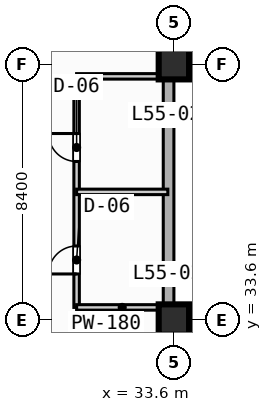
"""IFC4 building model, lengths in metres.
Left out: names, types, materials, properties, quantities, classifications, styles, units other than length and angle.
Written with IfcOpenShell. Run it as: python <this file> out.ifc"""

import sys

from ifc_helpers import new_model, si_unit, direction, frame, frame_2d, origin, origin_2d, place, context, subcontext, project, spatial, rectangle, extrude, element, fill, save


model = new_model("IFC4")
c1 = context("Model", 3, precision=1e-05, world=origin(), true_north=direction((0.0, 1.0)))
c2 = subcontext(c1, "Body", "Model", "MODEL_VIEW")
j1 = project(units=[si_unit("LENGTHUNIT", "METRE"), si_unit("PLANEANGLEUNIT", "RADIAN")], contexts=[c1])
p1 = place(None, origin())
s1 = spatial("IfcSite", under=j1, at=p1, CompositionType="ELEMENT")
p2 = place(p1, origin())
s2 = spatial("IfcBuilding", under=s1, at=p2, CompositionType="ELEMENT")
p3 = place(p2, frame((0.0, 0.0, 224.0)))
s3 = spatial("IfcBuildingStorey", under=s2, at=p3, CompositionType="ELEMENT", Elevation=224.0)
for number, where, z_axis, x_axis in (
    (1, (33.6, 33.6, 0.0), (0.0, 0.0, 1.0), (1.0, 0.0, 0.0)),
    (2, (33.6, 42.0, 0.0), (0.0, 0.0, 1.0), (1.0, 0.0, 0.0)),
):
    element("IfcColumn", number, at=place(p3, frame(where, z_axis=z_axis, x_axis=x_axis)), inside=s3, PredefinedType="COLUMN", context=c2, shape_type="SweptSolid", body=[
        extrude(rectangle(XDim=1.0, YDim=1.0, at=origin_2d()), origin(), (0.0, 0.0, 1.0), 4.2),
    ])
p4 = place(p3, frame((33.425, 72.425, 0.0), z_axis=(0.0, 0.0, 1.0), x_axis=(0.0, -1.0, 0.0)))
e3 = element("IfcWall", 3, at=p4, inside=s3, PredefinedType="STANDARD", context=c2, shape_type="SweptSolid", body=[
    extrude(rectangle(XDim=39.0, YDim=0.35, at=frame_2d((19.5, 0.0))), origin(), (0.0, 0.0, 1.0), 3.75),
])
p5 = place(p3, frame((33.425, 33.425, 0.0), z_axis=(0.0, 0.0, 1.0), x_axis=(1.0, 0.0, 0.0)))
e4 = element("IfcWall", 4, at=p5, inside=s3, PredefinedType="STANDARD", context=c2, shape_type="SweptSolid", body=[
    extrude(rectangle(XDim=39.0, YDim=0.35, at=frame_2d((19.5, 0.0))), origin(), (0.0, 0.0, 1.0), 3.75),
])
p6 = place(p5, frame((12.075, 0.0, 0.0)))
e5 = element("IfcOpeningElement", 5, at=p6, cuts=e4, PredefinedType="OPENING", context=c2, shape_type="SweptSolid", body=[
    extrude(rectangle(XDim=1.4, YDim=2.2, at=frame_2d((0.7, 1.1))), frame((0.0, 0.185, 0.0), z_axis=(0.0, -1.0, 0.0), x_axis=(1.0, 0.0, 0.0)), (0.0, 0.0, 1.0), 0.37),
])
p7 = place(p3, frame((30.4, 34.0, 0.0), z_axis=(0.0, 0.0, 1.0), x_axis=(0.0, 1.0, 0.0)))
e6 = element("IfcWall", 6, at=p7, inside=s3, PredefinedType="PLUMBINGWALL", context=c2, shape_type="SweptSolid", body=[
    extrude(rectangle(XDim=7.6, YDim=0.18, at=frame_2d((3.8, 0.0))), origin(), (0.0, 0.0, 1.0), 3.75),
])
p8 = place(p7, frame((1.1, 0.0, 0.0)))
e7 = element("IfcOpeningElement", 7, at=p8, cuts=e6, PredefinedType="OPENING", context=c2, shape_type="SweptSolid", body=[
    extrude(rectangle(XDim=0.92, YDim=2.1, at=frame_2d((0.46, 1.05))), frame((0.0, 0.1, 0.0), z_axis=(0.0, -1.0, 0.0), x_axis=(1.0, 0.0, 0.0)), (0.0, 0.0, 1.0), 0.2),
])
p9 = place(p7, frame((4.8, 0.0, 0.0)))
e8 = element("IfcOpeningElement", 8, at=p9, cuts=e6, PredefinedType="OPENING", context=c2, shape_type="SweptSolid", body=[
    extrude(rectangle(XDim=0.92, YDim=2.1, at=frame_2d((0.46, 1.05))), frame((0.0, 0.1, 0.0), z_axis=(0.0, -1.0, 0.0), x_axis=(1.0, 0.0, 0.0)), (0.0, 0.0, 1.0), 0.2),
])
for number, where, z_axis, x_axis in (
    (9, (30.4, 34.0, 0.0), (0.0, 0.0, 1.0), (1.0, 0.0, 0.0)),
    (10, (30.4, 37.8, 0.0), (0.0, 0.0, 1.0), (1.0, 0.0, 0.0)),
    (11, (30.4, 41.6, 0.0), (0.0, 0.0, 1.0), (1.0, 0.0, 0.0)),
):
    element("IfcWall", number, at=place(p3, frame(where, z_axis=z_axis, x_axis=x_axis)), inside=s3, PredefinedType="PLUMBINGWALL", context=c2, shape_type="SweptSolid", body=[
        extrude(rectangle(XDim=3.0, YDim=0.18, at=frame_2d((1.5, 0.0))), origin(), (0.0, 0.0, 1.0), 3.75),
    ])
p10 = place(p8, origin())
e12 = element("IfcDoor", 12, at=p10, inside=s3, OperationType="SINGLE_SWING_LEFT", PredefinedType="DOOR", context=c2, shape_type="SweptSolid", body=[
    extrude(rectangle(XDim=0.92, YDim=2.1, at=frame_2d((0.46, 1.05))), frame((0.0, 0.025, 0.0), z_axis=(0.0, -1.0, 0.0), x_axis=(1.0, 0.0, 0.0)), (0.0, 0.0, 1.0), 0.05),
])
fill(e7, e12)
p11 = place(p9, origin())
e13 = element("IfcDoor", 13, at=p11, inside=s3, OperationType="SINGLE_SWING_RIGHT", PredefinedType="DOOR", context=c2, shape_type="SweptSolid", body=[
    extrude(rectangle(XDim=0.92, YDim=2.1, at=frame_2d((0.46, 1.05))), frame((0.0, 0.025, 0.0), z_axis=(0.0, -1.0, 0.0), x_axis=(1.0, 0.0, 0.0)), (0.0, 0.0, 1.0), 0.05),
])
fill(e8, e13)
save(model, sys.argv[1])
